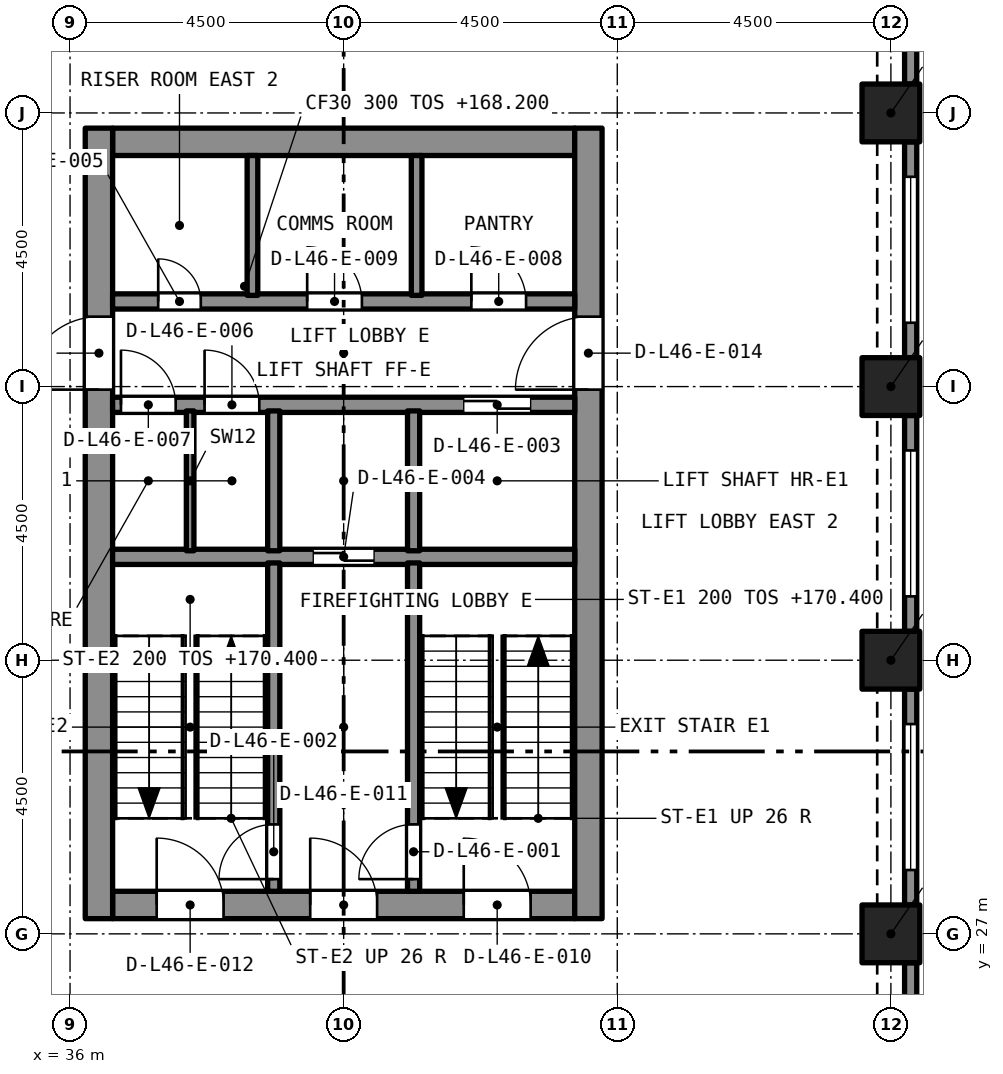
"""IFC4 building model, lengths in metres.
Left out: names, types, materials, properties, quantities, classifications, styles, units other than length and angle.
Written with IfcOpenShell. Run it as: python <this file> out.ifc"""

import sys

from ifc_helpers import new_model, si_unit, direction, frame, frame_2d, origin, origin_2d, place, context, subcontext, project, spatial, rectangle, extrude, element, fill, save


model = new_model("IFC4")
c1 = context("Model", 3, precision=1e-05, world=origin(), true_north=direction((0.0, 1.0)))
c2 = subcontext(c1, "Body", "Model", "MODEL_VIEW")
j1 = project(units=[si_unit("LENGTHUNIT", "METRE"), si_unit("PLANEANGLEUNIT", "RADIAN")], contexts=[c1])
p1 = place(None, origin())
s1 = spatial("IfcSite", under=j1, at=p1, CompositionType="ELEMENT")
p2 = place(p1, origin())
s2 = spatial("IfcBuilding", under=s1, at=p2, CompositionType="ELEMENT")
p3 = place(p2, frame((0.0, 0.0, 168.2)))
s3 = spatial("IfcBuildingStorey", under=s2, at=p3, CompositionType="ELEMENT", Elevation=168.2)
for number, where, z_axis, x_axis in (
    (1, (49.5, 27.0, 0.0), (0.0, 0.0, 1.0), (1.0, 0.0, 0.0)),
    (2, (49.5, 31.5, 0.0), (0.0, 0.0, 1.0), (1.0, 0.0, 0.0)),
    (3, (49.5, 36.0, 0.0), (0.0, 0.0, 1.0), (1.0, 0.0, 0.0)),
    (4, (49.5, 40.5, 0.0), (0.0, 0.0, 1.0), (1.0, 0.0, 0.0)),
):
    element("IfcColumn", number, at=place(p3, frame(where, z_axis=z_axis, x_axis=x_axis)), inside=s3, PredefinedType="COLUMN", context=c2, shape_type="SweptSolid", body=[
        extrude(rectangle(XDim=0.95, YDim=0.95, at=origin_2d()), origin(), (0.0, 0.0, 1.0), 4.4),
    ])
p4 = place(p3, frame((36.7, 27.475, 0.0), z_axis=(0.0, 0.0, 1.0), x_axis=(1.0, 0.0, 0.0)))
e5 = element("IfcWall", 5, at=p4, inside=s3, PredefinedType="SOLIDWALL", context=c2, shape_type="SweptSolid", body=[
    extrude(rectangle(XDim=7.6, YDim=0.45, at=frame_2d((3.8, 0.0))), origin(), (0.0, 0.0, 1.0), 4.4),
])
p5 = place(p4, frame((5.775, 0.0, 0.0)))
e6 = element("IfcOpeningElement", 6, at=p5, cuts=e5, PredefinedType="OPENING", context=c2, shape_type="SweptSolid", body=[
    extrude(rectangle(XDim=1.1, YDim=2.1, at=frame_2d((0.55, 1.05))), frame((0.0, 0.235, 0.0), z_axis=(0.0, -1.0, 0.0), x_axis=(1.0, 0.0, 0.0)), (0.0, 0.0, 1.0), 0.47),
])
p6 = place(p4, frame((3.25, 0.0, 0.0)))
e7 = element("IfcOpeningElement", 7, at=p6, cuts=e5, PredefinedType="OPENING", context=c2, shape_type="SweptSolid", body=[
    extrude(rectangle(XDim=1.1, YDim=2.1, at=frame_2d((0.55, 1.05))), frame((0.0, 0.235, 0.0), z_axis=(0.0, -1.0, 0.0), x_axis=(1.0, 0.0, 0.0)), (0.0, 0.0, 1.0), 0.47),
])
p7 = place(p4, frame((0.725, 0.0, 0.0)))
e8 = element("IfcOpeningElement", 8, at=p7, cuts=e5, PredefinedType="OPENING", context=c2, shape_type="SweptSolid", body=[
    extrude(rectangle(XDim=1.1, YDim=2.1, at=frame_2d((0.55, 1.05))), frame((0.0, 0.235, 0.0), z_axis=(0.0, -1.0, 0.0), x_axis=(1.0, 0.0, 0.0)), (0.0, 0.0, 1.0), 0.47),
])
p8 = place(p3, frame((36.7, 40.025, 0.0), z_axis=(0.0, 0.0, 1.0), x_axis=(1.0, 0.0, 0.0)))
e9 = element("IfcWall", 9, at=p8, inside=s3, PredefinedType="SOLIDWALL", context=c2, shape_type="SweptSolid", body=[
    extrude(rectangle(XDim=7.6, YDim=0.45, at=frame_2d((3.8, 0.0))), origin(), (0.0, 0.0, 1.0), 4.4),
])
p9 = place(p3, frame((36.475, 27.25, 0.0), z_axis=(0.0, 0.0, 1.0), x_axis=(0.0, 1.0, 0.0)))
e10 = element("IfcWall", 10, at=p9, inside=s3, PredefinedType="SOLIDWALL", context=c2, shape_type="SweptSolid", body=[
    extrude(rectangle(XDim=13.0, YDim=0.45, at=frame_2d((6.5, 0.0))), origin(), (0.0, 0.0, 1.0), 4.4),
])
p10 = place(p9, frame((8.7, 0.0, 0.0)))
e11 = element("IfcOpeningElement", 11, at=p10, cuts=e10, PredefinedType="OPENING", context=c2, shape_type="SweptSolid", body=[
    extrude(rectangle(XDim=1.2, YDim=2.1, at=frame_2d((0.6, 1.05))), frame((0.0, 0.235, 0.0), z_axis=(0.0, -1.0, 0.0), x_axis=(1.0, 0.0, 0.0)), (0.0, 0.0, 1.0), 0.47),
])
p11 = place(p3, frame((44.525, 27.25, 0.0), z_axis=(0.0, 0.0, 1.0), x_axis=(0.0, 1.0, 0.0)))
e12 = element("IfcWall", 12, at=p11, inside=s3, PredefinedType="SOLIDWALL", context=c2, shape_type="SweptSolid", body=[
    extrude(rectangle(XDim=13.0, YDim=0.45, at=frame_2d((6.5, 0.0))), origin(), (0.0, 0.0, 1.0), 4.4),
])
p12 = place(p11, frame((8.7, 0.0, 0.0)))
e13 = element("IfcOpeningElement", 13, at=p12, cuts=e12, PredefinedType="OPENING", context=c2, shape_type="SweptSolid", body=[
    extrude(rectangle(XDim=1.2, YDim=2.1, at=frame_2d((0.6, 1.05))), frame((0.0, 0.235, 0.0), z_axis=(0.0, -1.0, 0.0), x_axis=(1.0, 0.0, 0.0)), (0.0, 0.0, 1.0), 0.47),
])
p13 = place(p3, frame((49.825, 26.525, 0.0), z_axis=(0.0, 0.0, 1.0), x_axis=(0.0, -1.0, 0.0)))
e14 = element("IfcWall", 14, at=p13, inside=s3, PredefinedType="SOLIDWALL", context=c2, shape_type="SweptSolid", body=[
    extrude(rectangle(XDim=3.55, YDim=0.2, at=frame_2d((1.775, 0.0))), origin(), (0.0, 0.0, 1.0), 4.4),
])
p14 = place(p13, frame((0.575, 0.0, 0.45)))
e15 = element("IfcOpeningElement", 15, at=p14, cuts=e14, PredefinedType="OPENING", context=c2, shape_type="SweptSolid", body=[
    extrude(rectangle(XDim=2.4, YDim=2.55, at=frame_2d((1.2, 1.275))), frame((0.0, 0.11, 0.0), z_axis=(0.0, -1.0, 0.0), x_axis=(1.0, 0.0, 0.0)), (0.0, 0.0, 1.0), 0.22),
])
p15 = place(p3, frame((49.825, 31.025, 0.0), z_axis=(0.0, 0.0, 1.0), x_axis=(0.0, -1.0, 0.0)))
e16 = element("IfcWall", 16, at=p15, inside=s3, PredefinedType="SOLIDWALL", context=c2, shape_type="SweptSolid", body=[
    extrude(rectangle(XDim=3.55, YDim=0.2, at=frame_2d((1.775, 0.0))), origin(), (0.0, 0.0, 1.0), 4.4),
])
p16 = place(p15, frame((0.575, 0.0, 0.45)))
e17 = element("IfcOpeningElement", 17, at=p16, cuts=e16, PredefinedType="OPENING", context=c2, shape_type="SweptSolid", body=[
    extrude(rectangle(XDim=2.4, YDim=2.55, at=frame_2d((1.2, 1.275))), frame((0.0, 0.11, 0.0), z_axis=(0.0, -1.0, 0.0), x_axis=(1.0, 0.0, 0.0)), (0.0, 0.0, 1.0), 0.22),
])
p17 = place(p3, frame((49.825, 35.525, 0.0), z_axis=(0.0, 0.0, 1.0), x_axis=(0.0, -1.0, 0.0)))
e18 = element("IfcWall", 18, at=p17, inside=s3, PredefinedType="SOLIDWALL", context=c2, shape_type="SweptSolid", body=[
    extrude(rectangle(XDim=3.55, YDim=0.2, at=frame_2d((1.775, 0.0))), origin(), (0.0, 0.0, 1.0), 4.4),
])
p18 = place(p17, frame((0.575, 0.0, 0.45)))
e19 = element("IfcOpeningElement", 19, at=p18, cuts=e18, PredefinedType="OPENING", context=c2, shape_type="SweptSolid", body=[
    extrude(rectangle(XDim=2.4, YDim=2.55, at=frame_2d((1.2, 1.275))), frame((0.0, 0.11, 0.0), z_axis=(0.0, -1.0, 0.0), x_axis=(1.0, 0.0, 0.0)), (0.0, 0.0, 1.0), 0.22),
])
p19 = place(p3, frame((49.825, 40.025, 0.0), z_axis=(0.0, 0.0, 1.0), x_axis=(0.0, -1.0, 0.0)))
e20 = element("IfcWall", 20, at=p19, inside=s3, PredefinedType="SOLIDWALL", context=c2, shape_type="SweptSolid", body=[
    extrude(rectangle(XDim=3.55, YDim=0.2, at=frame_2d((1.775, 0.0))), origin(), (0.0, 0.0, 1.0), 4.4),
])
p20 = place(p19, frame((0.575, 0.0, 0.45)))
e21 = element("IfcOpeningElement", 21, at=p20, cuts=e20, PredefinedType="OPENING", context=c2, shape_type="SweptSolid", body=[
    extrude(rectangle(XDim=2.4, YDim=2.55, at=frame_2d((1.2, 1.275))), frame((0.0, 0.11, 0.0), z_axis=(0.0, -1.0, 0.0), x_axis=(1.0, 0.0, 0.0)), (0.0, 0.0, 1.0), 0.22),
])
p21 = place(p3, frame((49.825, 44.525, 0.0), z_axis=(0.0, 0.0, 1.0), x_axis=(0.0, -1.0, 0.0)))
e22 = element("IfcWall", 22, at=p21, inside=s3, PredefinedType="SOLIDWALL", context=c2, shape_type="SweptSolid", body=[
    extrude(rectangle(XDim=3.55, YDim=0.2, at=frame_2d((1.775, 0.0))), origin(), (0.0, 0.0, 1.0), 4.4),
])
p22 = place(p21, frame((0.575, 0.0, 0.45)))
e23 = element("IfcOpeningElement", 23, at=p22, cuts=e22, PredefinedType="OPENING", context=c2, shape_type="SweptSolid", body=[
    extrude(rectangle(XDim=2.4, YDim=2.55, at=frame_2d((1.2, 1.275))), frame((0.0, 0.11, 0.0), z_axis=(0.0, -1.0, 0.0), x_axis=(1.0, 0.0, 0.0)), (0.0, 0.0, 1.0), 0.22),
])
p23 = place(p3, frame((36.7, 33.2, 0.0), z_axis=(0.0, 0.0, 1.0), x_axis=(1.0, 0.0, 0.0)))
e24 = element("IfcWall", 24, at=p23, inside=s3, PredefinedType="SOLIDWALL", context=c2, shape_type="SweptSolid", body=[
    extrude(rectangle(XDim=7.6, YDim=0.25, at=frame_2d((3.8, 0.0))), origin(), (0.0, 0.0, 1.0), 4.1),
])
p24 = place(p23, frame((3.3, 0.0, 0.0)))
e25 = element("IfcOpeningElement", 25, at=p24, cuts=e24, PredefinedType="OPENING", context=c2, shape_type="SweptSolid", body=[
    extrude(rectangle(XDim=1.0, YDim=2.1, at=frame_2d((0.5, 1.05))), frame((0.0, 0.135, 0.0), z_axis=(0.0, -1.0, 0.0), x_axis=(1.0, 0.0, 0.0)), (0.0, 0.0, 1.0), 0.27),
])
p25 = place(p3, frame((36.7, 35.7, 0.0), z_axis=(0.0, 0.0, 1.0), x_axis=(1.0, 0.0, 0.0)))
e26 = element("IfcWall", 26, at=p25, inside=s3, PredefinedType="SOLIDWALL", context=c2, shape_type="SweptSolid", body=[
    extrude(rectangle(XDim=7.6, YDim=0.25, at=frame_2d((3.8, 0.0))), origin(), (0.0, 0.0, 1.0), 4.1),
])
p26 = place(p25, frame((5.775, 0.0, 0.0)))
e27 = element("IfcOpeningElement", 27, at=p26, cuts=e26, PredefinedType="OPENING", context=c2, shape_type="SweptSolid", body=[
    extrude(rectangle(XDim=1.1, YDim=2.4, at=frame_2d((0.55, 1.2))), frame((0.0, 0.135, 0.0), z_axis=(0.0, -1.0, 0.0), x_axis=(1.0, 0.0, 0.0)), (0.0, 0.0, 1.0), 0.27),
])
p27 = place(p25, frame((1.512, 0.0, 0.0)))
e28 = element("IfcOpeningElement", 28, at=p27, cuts=e26, PredefinedType="OPENING", context=c2, shape_type="SweptSolid", body=[
    extrude(rectangle(XDim=0.9, YDim=2.1, at=frame_2d((0.45, 1.05))), frame((0.0, 0.135, 0.0), z_axis=(0.0, -1.0, 0.0), x_axis=(1.0, 0.0, 0.0)), (0.0, 0.0, 1.0), 0.27),
])
p28 = place(p25, frame((0.137, 0.0, 0.0)))
e29 = element("IfcOpeningElement", 29, at=p28, cuts=e26, PredefinedType="OPENING", context=c2, shape_type="SweptSolid", body=[
    extrude(rectangle(XDim=0.9, YDim=2.1, at=frame_2d((0.45, 1.05))), frame((0.0, 0.135, 0.0), z_axis=(0.0, -1.0, 0.0), x_axis=(1.0, 0.0, 0.0)), (0.0, 0.0, 1.0), 0.27),
])
p29 = place(p3, frame((36.7, 37.4, 0.0), z_axis=(0.0, 0.0, 1.0), x_axis=(1.0, 0.0, 0.0)))
e30 = element("IfcWall", 30, at=p29, inside=s3, PredefinedType="SOLIDWALL", context=c2, shape_type="SweptSolid", body=[
    extrude(rectangle(XDim=7.6, YDim=0.25, at=frame_2d((3.8, 0.0))), origin(), (0.0, 0.0, 1.0), 4.1),
])
p30 = place(p29, frame((0.75, 0.0, 0.0)))
e31 = element("IfcOpeningElement", 31, at=p30, cuts=e30, PredefinedType="OPENING", context=c2, shape_type="SweptSolid", body=[
    extrude(rectangle(XDim=0.7, YDim=2.1, at=frame_2d((0.35, 1.05))), frame((0.0, 0.135, 0.0), z_axis=(0.0, -1.0, 0.0), x_axis=(1.0, 0.0, 0.0)), (0.0, 0.0, 1.0), 0.27),
])
p31 = place(p29, frame((5.9, 0.0, 0.0)))
e32 = element("IfcOpeningElement", 32, at=p31, cuts=e30, PredefinedType="OPENING", context=c2, shape_type="SweptSolid", body=[
    extrude(rectangle(XDim=0.9, YDim=2.1, at=frame_2d((0.45, 1.05))), frame((0.0, 0.135, 0.0), z_axis=(0.0, -1.0, 0.0), x_axis=(1.0, 0.0, 0.0)), (0.0, 0.0, 1.0), 0.27),
])
p32 = place(p29, frame((3.2, 0.0, 0.0)))
e33 = element("IfcOpeningElement", 33, at=p32, cuts=e30, PredefinedType="OPENING", context=c2, shape_type="SweptSolid", body=[
    extrude(rectangle(XDim=0.9, YDim=2.1, at=frame_2d((0.45, 1.05))), frame((0.0, 0.135, 0.0), z_axis=(0.0, -1.0, 0.0), x_axis=(1.0, 0.0, 0.0)), (0.0, 0.0, 1.0), 0.27),
])
p33 = place(p3, frame((41.65, 27.7, 0.0), z_axis=(0.0, 0.0, 1.0), x_axis=(0.0, 1.0, 0.0)))
e34 = element("IfcWall", 34, at=p33, inside=s3, PredefinedType="SOLIDWALL", context=c2, shape_type="SweptSolid", body=[
    extrude(rectangle(XDim=5.4, YDim=0.2, at=frame_2d((2.7, 0.0))), origin(), (0.0, 0.0, 1.0), 4.1),
])
p34 = place(p33, frame((0.2, 0.0, 0.0)))
e35 = element("IfcOpeningElement", 35, at=p34, cuts=e34, PredefinedType="OPENING", context=c2, shape_type="SweptSolid", body=[
    extrude(rectangle(XDim=0.9, YDim=2.1, at=frame_2d((0.45, 1.05))), frame((0.0, 0.11, 0.0), z_axis=(0.0, -1.0, 0.0), x_axis=(1.0, 0.0, 0.0)), (0.0, 0.0, 1.0), 0.22),
])
p35 = place(p3, frame((39.35, 27.7, 0.0), z_axis=(0.0, 0.0, 1.0), x_axis=(0.0, 1.0, 0.0)))
e36 = element("IfcWall", 36, at=p35, inside=s3, PredefinedType="SOLIDWALL", context=c2, shape_type="SweptSolid", body=[
    extrude(rectangle(XDim=5.4, YDim=0.2, at=frame_2d((2.7, 0.0))), origin(), (0.0, 0.0, 1.0), 4.1),
])
p36 = place(p35, frame((0.2, 0.0, 0.0)))
e37 = element("IfcOpeningElement", 37, at=p36, cuts=e36, PredefinedType="OPENING", context=c2, shape_type="SweptSolid", body=[
    extrude(rectangle(XDim=0.9, YDim=2.1, at=frame_2d((0.45, 1.05))), frame((0.0, 0.11, 0.0), z_axis=(0.0, -1.0, 0.0), x_axis=(1.0, 0.0, 0.0)), (0.0, 0.0, 1.0), 0.22),
])
for number, where, z_axis, x_axis in (
    (38, (41.65, 33.3, 0.0), (0.0, 0.0, 1.0), (0.0, 1.0, 0.0)),
    (39, (39.35, 33.3, 0.0), (0.0, 0.0, 1.0), (0.0, 1.0, 0.0)),
):
    element("IfcWall", number, at=place(p3, frame(where, z_axis=z_axis, x_axis=x_axis)), inside=s3, PredefinedType="SOLIDWALL", context=c2, shape_type="SweptSolid", body=[
        extrude(rectangle(XDim=2.3, YDim=0.2, at=frame_2d((1.15, 0.0))), origin(), (0.0, 0.0, 1.0), 4.1),
    ])
for number, where, z_axis, x_axis in (
    (40, (41.7, 37.5, 0.0), (0.0, 0.0, 1.0), (0.0, 1.0, 0.0)),
    (41, (39.0, 37.5, 0.0), (0.0, 0.0, 1.0), (0.0, 1.0, 0.0)),
):
    element("IfcWall", number, at=place(p3, frame(where, z_axis=z_axis, x_axis=x_axis)), inside=s3, PredefinedType="SOLIDWALL", context=c2, shape_type="SweptSolid", body=[
        extrude(rectangle(XDim=2.3, YDim=0.175, at=frame_2d((1.15, 0.0))), origin(), (0.0, 0.0, 1.0), 4.1),
    ])
p37 = place(p3, frame((37.975, 33.3, 0.0), z_axis=(0.0, 0.0, 1.0), x_axis=(0.0, 1.0, 0.0)))
e42 = element("IfcWall", 42, at=p37, inside=s3, PredefinedType="PARTITIONING", context=c2, shape_type="SweptSolid", body=[
    extrude(rectangle(XDim=2.3, YDim=0.125, at=frame_2d((1.15, 0.0))), origin(), (0.0, 0.0, 1.0), 4.1),
])
p38 = place(p16, origin())
e43 = element("IfcWindow", 43, at=p38, inside=s3, PartitioningType="SINGLE_PANEL", PredefinedType="WINDOW", context=c2, shape_type="SweptSolid", body=[
    extrude(rectangle(XDim=2.4, YDim=2.55, at=frame_2d((1.2, 1.275))), frame((0.0, 0.03, 0.0), z_axis=(0.0, -1.0, 0.0), x_axis=(1.0, 0.0, 0.0)), (0.0, 0.0, 1.0), 0.06),
])
fill(e17, e43)
p39 = place(p18, origin())
e44 = element("IfcWindow", 44, at=p39, inside=s3, PartitioningType="SINGLE_PANEL", PredefinedType="WINDOW", context=c2, shape_type="SweptSolid", body=[
    extrude(rectangle(XDim=2.4, YDim=2.55, at=frame_2d((1.2, 1.275))), frame((0.0, 0.03, 0.0), z_axis=(0.0, -1.0, 0.0), x_axis=(1.0, 0.0, 0.0)), (0.0, 0.0, 1.0), 0.06),
])
fill(e19, e44)
p40 = place(p20, origin())
e45 = element("IfcWindow", 45, at=p40, inside=s3, PartitioningType="SINGLE_PANEL", PredefinedType="WINDOW", context=c2, shape_type="SweptSolid", body=[
    extrude(rectangle(XDim=2.4, YDim=2.55, at=frame_2d((1.2, 1.275))), frame((0.0, 0.03, 0.0), z_axis=(0.0, -1.0, 0.0), x_axis=(1.0, 0.0, 0.0)), (0.0, 0.0, 1.0), 0.06),
])
fill(e21, e45)
p41 = place(p34, origin())
e46 = element("IfcDoor", 46, at=p41, inside=s3, OperationType="SINGLE_SWING_LEFT", PredefinedType="DOOR", context=c2, shape_type="SweptSolid", body=[
    extrude(rectangle(XDim=0.9, YDim=2.1, at=frame_2d((0.45, 1.05))), frame((0.0, 0.025, 0.0), z_axis=(0.0, -1.0, 0.0), x_axis=(1.0, 0.0, 0.0)), (0.0, 0.0, 1.0), 0.05),
])
fill(e35, e46)
p42 = place(p36, origin())
e47 = element("IfcDoor", 47, at=p42, inside=s3, OperationType="SINGLE_SWING_LEFT", PredefinedType="DOOR", context=c2, shape_type="SweptSolid", body=[
    extrude(rectangle(XDim=0.9, YDim=2.1, at=frame_2d((0.45, 1.05))), frame((0.0, 0.025, 0.0), z_axis=(0.0, -1.0, 0.0), x_axis=(1.0, 0.0, 0.0)), (0.0, 0.0, 1.0), 0.05),
])
fill(e37, e47)
p43 = place(p26, origin())
e48 = element("IfcDoor", 48, at=p43, inside=s3, OperationType="SLIDING_TO_LEFT", PredefinedType="DOOR", context=c2, shape_type="SweptSolid", body=[
    extrude(rectangle(XDim=1.1, YDim=2.4, at=frame_2d((0.55, 1.2))), frame((0.0, 0.025, 0.0), z_axis=(0.0, -1.0, 0.0), x_axis=(1.0, 0.0, 0.0)), (0.0, 0.0, 1.0), 0.05),
])
fill(e27, e48)
p44 = place(p24, origin())
e49 = element("IfcDoor", 49, at=p44, inside=s3, OperationType="SLIDING_TO_LEFT", PredefinedType="DOOR", context=c2, shape_type="SweptSolid", body=[
    extrude(rectangle(XDim=1.0, YDim=2.1, at=frame_2d((0.5, 1.05))), frame((0.0, 0.025, 0.0), z_axis=(0.0, -1.0, 0.0), x_axis=(1.0, 0.0, 0.0)), (0.0, 0.0, 1.0), 0.05),
])
fill(e25, e49)
p45 = place(p30, origin())
e50 = element("IfcDoor", 50, at=p45, inside=s3, OperationType="SINGLE_SWING_LEFT", PredefinedType="DOOR", context=c2, shape_type="SweptSolid", body=[
    extrude(rectangle(XDim=0.7, YDim=2.1, at=frame_2d((0.35, 1.05))), frame((0.0, 0.025, 0.0), z_axis=(0.0, -1.0, 0.0), x_axis=(1.0, 0.0, 0.0)), (0.0, 0.0, 1.0), 0.05),
])
fill(e31, e50)
p46 = place(p27, origin())
e51 = element("IfcDoor", 51, at=p46, inside=s3, OperationType="SINGLE_SWING_LEFT", PredefinedType="DOOR", context=c2, shape_type="SweptSolid", body=[
    extrude(rectangle(XDim=0.9, YDim=2.1, at=frame_2d((0.45, 1.05))), frame((0.0, 0.025, 0.0), z_axis=(0.0, -1.0, 0.0), x_axis=(1.0, 0.0, 0.0)), (0.0, 0.0, 1.0), 0.05),
])
fill(e28, e51)
p47 = place(p28, origin())
e52 = element("IfcDoor", 52, at=p47, inside=s3, OperationType="SINGLE_SWING_LEFT", PredefinedType="DOOR", context=c2, shape_type="SweptSolid", body=[
    extrude(rectangle(XDim=0.9, YDim=2.1, at=frame_2d((0.45, 1.05))), frame((0.0, 0.025, 0.0), z_axis=(0.0, -1.0, 0.0), x_axis=(1.0, 0.0, 0.0)), (0.0, 0.0, 1.0), 0.05),
])
fill(e29, e52)
p48 = place(p31, origin())
e53 = element("IfcDoor", 53, at=p48, inside=s3, OperationType="SINGLE_SWING_LEFT", PredefinedType="DOOR", context=c2, shape_type="SweptSolid", body=[
    extrude(rectangle(XDim=0.9, YDim=2.1, at=frame_2d((0.45, 1.05))), frame((0.0, 0.025, 0.0), z_axis=(0.0, -1.0, 0.0), x_axis=(1.0, 0.0, 0.0)), (0.0, 0.0, 1.0), 0.05),
])
fill(e32, e53)
p49 = place(p32, origin())
e54 = element("IfcDoor", 54, at=p49, inside=s3, OperationType="SINGLE_SWING_LEFT", PredefinedType="DOOR", context=c2, shape_type="SweptSolid", body=[
    extrude(rectangle(XDim=0.9, YDim=2.1, at=frame_2d((0.45, 1.05))), frame((0.0, 0.025, 0.0), z_axis=(0.0, -1.0, 0.0), x_axis=(1.0, 0.0, 0.0)), (0.0, 0.0, 1.0), 0.05),
])
fill(e33, e54)
p50 = place(p5, origin())
e55 = element("IfcDoor", 55, at=p50, inside=s3, OperationType="SINGLE_SWING_LEFT", PredefinedType="DOOR", context=c2, shape_type="SweptSolid", body=[
    extrude(rectangle(XDim=1.1, YDim=2.1, at=frame_2d((0.55, 1.05))), frame((0.0, 0.025, 0.0), z_axis=(0.0, -1.0, 0.0), x_axis=(1.0, 0.0, 0.0)), (0.0, 0.0, 1.0), 0.05),
])
fill(e6, e55)
p51 = place(p6, origin())
e56 = element("IfcDoor", 56, at=p51, inside=s3, OperationType="SINGLE_SWING_LEFT", PredefinedType="DOOR", context=c2, shape_type="SweptSolid", body=[
    extrude(rectangle(XDim=1.1, YDim=2.1, at=frame_2d((0.55, 1.05))), frame((0.0, 0.025, 0.0), z_axis=(0.0, -1.0, 0.0), x_axis=(1.0, 0.0, 0.0)), (0.0, 0.0, 1.0), 0.05),
])
fill(e7, e56)
p52 = place(p7, origin())
e57 = element("IfcDoor", 57, at=p52, inside=s3, OperationType="SINGLE_SWING_LEFT", PredefinedType="DOOR", context=c2, shape_type="SweptSolid", body=[
    extrude(rectangle(XDim=1.1, YDim=2.1, at=frame_2d((0.55, 1.05))), frame((0.0, 0.025, 0.0), z_axis=(0.0, -1.0, 0.0), x_axis=(1.0, 0.0, 0.0)), (0.0, 0.0, 1.0), 0.05),
])
fill(e8, e57)
p53 = place(p10, origin())
e58 = element("IfcDoor", 58, at=p53, inside=s3, OperationType="SINGLE_SWING_LEFT", PredefinedType="DOOR", context=c2, shape_type="SweptSolid", body=[
    extrude(rectangle(XDim=1.2, YDim=2.1, at=frame_2d((0.6, 1.05))), frame((0.0, 0.025, 0.0), z_axis=(0.0, -1.0, 0.0), x_axis=(1.0, 0.0, 0.0)), (0.0, 0.0, 1.0), 0.05),
])
fill(e11, e58)
p54 = place(p12, origin())
e59 = element("IfcDoor", 59, at=p54, inside=s3, OperationType="SINGLE_SWING_LEFT", PredefinedType="DOOR", context=c2, shape_type="SweptSolid", body=[
    extrude(rectangle(XDim=1.2, YDim=2.1, at=frame_2d((0.6, 1.05))), frame((0.0, 0.025, 0.0), z_axis=(0.0, -1.0, 0.0), x_axis=(1.0, 0.0, 0.0)), (0.0, 0.0, 1.0), 0.05),
])
fill(e13, e59)
save(model, sys.argv[1])
